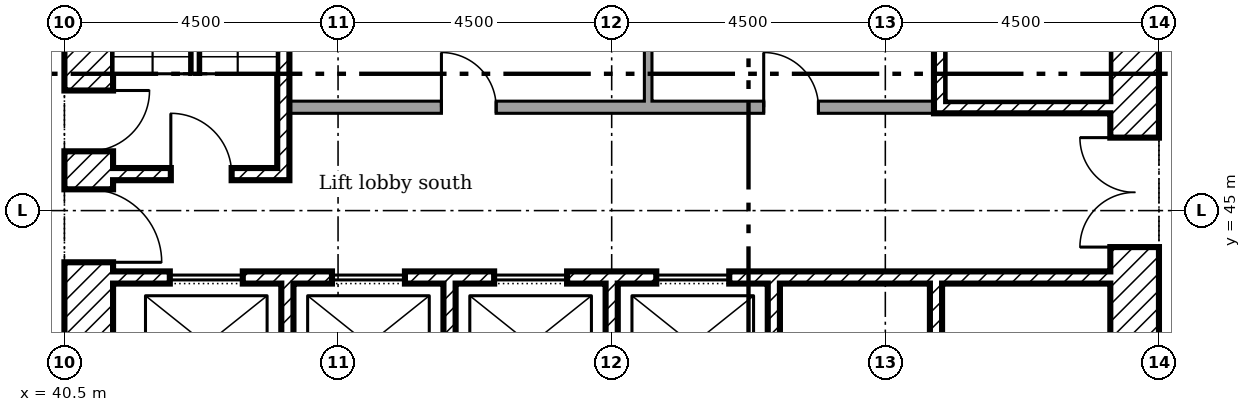
"""IFC4 building model, lengths in metres.
Left out: names, types, materials, properties, quantities, classifications, styles, units other than length and angle.
Written with IfcOpenShell. Run it as: python <this file> out.ifc"""

import sys

from ifc_helpers import new_model, si_unit, direction, frame, frame_2d, origin, place, context, subcontext, project, spatial, rectangle, extrude, element, fill, save


model = new_model("IFC4")
c1 = context("Model", 3, precision=1e-05, world=origin(), true_north=direction((0.0, 1.0)))
c2 = subcontext(c1, "Body", "Model", "MODEL_VIEW")
j1 = project(units=[si_unit("LENGTHUNIT", "METRE"), si_unit("PLANEANGLEUNIT", "RADIAN")], contexts=[c1])
p1 = place(None, origin())
s1 = spatial("IfcSite", under=j1, at=p1, CompositionType="ELEMENT")
p2 = place(p1, origin())
s2 = spatial("IfcBuilding", under=s1, at=p2, CompositionType="ELEMENT")
p3 = place(p2, frame((0.0, 0.0, 54.6)))
s3 = spatial("IfcBuildingStorey", under=s2, at=p3, CompositionType="ELEMENT", Elevation=54.6)
p4 = place(p3, frame((58.1, 40.5, 0.0), z_axis=(0.0, 0.0, 1.0), x_axis=(0.0, 1.0, 0.0)))
e1 = element("IfcWall", 1, at=p4, inside=s3, PredefinedType="SHEAR", context=c2, shape_type="SweptSolid", body=[
    extrude(rectangle(XDim=18.0, YDim=0.8, at=frame_2d((9.0, 0.0))), origin(), (0.0, 0.0, 1.0), 3.35),
])
p5 = place(p4, frame((13.15, 0.0, 0.0)))
e2 = element("IfcOpeningElement", 2, at=p5, cuts=e1, PredefinedType="OPENING", context=c2, shape_type="SweptSolid", body=[
    extrude(rectangle(XDim=1.2, YDim=2.1, at=frame_2d((0.6, 1.05))), frame((0.0, 0.41, 0.0), z_axis=(0.0, -1.0, 0.0), x_axis=(1.0, 0.0, 0.0)), (0.0, 0.0, 1.0), 0.82),
])
p6 = place(p4, frame((3.9, 0.0, 0.0)))
e3 = element("IfcOpeningElement", 3, at=p6, cuts=e1, PredefinedType="OPENING", context=c2, shape_type="SweptSolid", body=[
    extrude(rectangle(XDim=1.8, YDim=2.1, at=frame_2d((0.9, 1.05))), frame((0.0, 0.41, 0.0), z_axis=(0.0, -1.0, 0.0), x_axis=(1.0, 0.0, 0.0)), (0.0, 0.0, 1.0), 0.82),
])
p7 = place(p4, frame((11.525, 0.0, 0.0)))
e4 = element("IfcOpeningElement", 4, at=p7, cuts=e1, PredefinedType="OPENING", context=c2, shape_type="SweptSolid", body=[
    extrude(rectangle(XDim=1.0, YDim=2.1, at=frame_2d((0.5, 1.05))), frame((0.0, 0.41, 0.0), z_axis=(0.0, -1.0, 0.0), x_axis=(1.0, 0.0, 0.0)), (0.0, 0.0, 1.0), 0.82),
])
p8 = place(p3, frame((40.9, 40.5, 0.0), z_axis=(0.0, 0.0, 1.0), x_axis=(0.0, 1.0, 0.0)))
e5 = element("IfcWall", 5, at=p8, inside=s3, PredefinedType="SHEAR", context=c2, shape_type="SweptSolid", body=[
    extrude(rectangle(XDim=18.0, YDim=0.8, at=frame_2d((9.0, 0.0))), origin(), (0.0, 0.0, 1.0), 3.35),
])
p9 = place(p8, frame((3.65, 0.0, 0.0)))
e6 = element("IfcOpeningElement", 6, at=p9, cuts=e5, PredefinedType="OPENING", context=c2, shape_type="SweptSolid", body=[
    extrude(rectangle(XDim=1.2, YDim=2.1, at=frame_2d((0.6, 1.05))), frame((0.0, 0.41, 0.0), z_axis=(0.0, -1.0, 0.0), x_axis=(1.0, 0.0, 0.0)), (0.0, 0.0, 1.0), 0.82),
])
p10 = place(p8, frame((5.475, 0.0, 0.0)))
e7 = element("IfcOpeningElement", 7, at=p10, cuts=e5, PredefinedType="OPENING", context=c2, shape_type="SweptSolid", body=[
    extrude(rectangle(XDim=1.0, YDim=2.1, at=frame_2d((0.5, 1.05))), frame((0.0, 0.41, 0.0), z_axis=(0.0, -1.0, 0.0), x_axis=(1.0, 0.0, 0.0)), (0.0, 0.0, 1.0), 0.82),
])
p11 = place(p8, frame((12.3, 0.0, 0.0)))
e8 = element("IfcOpeningElement", 8, at=p11, cuts=e5, PredefinedType="OPENING", context=c2, shape_type="SweptSolid", body=[
    extrude(rectangle(XDim=1.0, YDim=2.1, at=frame_2d((0.5, 1.05))), frame((0.0, 0.41, 0.0), z_axis=(0.0, -1.0, 0.0), x_axis=(1.0, 0.0, 0.0)), (0.0, 0.0, 1.0), 0.82),
])
for number, where, z_axis, x_axis in (
    (9, (44.167, 41.3, 0.0), (0.0, 0.0, 1.0), (0.0, 1.0, 0.0)),
    (10, (46.833, 41.3, 0.0), (0.0, 0.0, 1.0), (0.0, 1.0, 0.0)),
    (11, (49.5, 41.3, 0.0), (0.0, 0.0, 1.0), (0.0, 1.0, 0.0)),
    (12, (52.167, 41.3, 0.0), (0.0, 0.0, 1.0), (0.0, 1.0, 0.0)),
    (13, (54.833, 41.3, 0.0), (0.0, 0.0, 1.0), (0.0, 1.0, 0.0)),
):
    element("IfcWall", number, at=place(p3, frame(where, z_axis=z_axis, x_axis=x_axis)), inside=s3, PredefinedType="SHEAR", context=c2, shape_type="SweptSolid", body=[
        extrude(rectangle(XDim=2.5, YDim=0.2, at=frame_2d((1.25, 0.0))), origin(), (0.0, 0.0, 1.0), 3.35),
    ])
p12 = place(p3, frame((41.3, 43.9, 0.0)))
e14 = element("IfcWall", 14, at=p12, inside=s3, PredefinedType="SHEAR", context=c2, shape_type="SweptSolid", body=[
    extrude(rectangle(XDim=16.4, YDim=0.2, at=frame_2d((8.2, 0.0))), origin(), (0.0, 0.0, 1.0), 3.35),
])
p13 = place(p12, frame((0.933, 0.0, 0.0)))
e15 = element("IfcOpeningElement", 15, at=p13, cuts=e14, PredefinedType="OPENING", context=c2, shape_type="SweptSolid", body=[
    extrude(rectangle(XDim=1.2, YDim=2.1, at=frame_2d((0.6, 1.05))), frame((0.0, 0.11, 0.0), z_axis=(0.0, -1.0, 0.0), x_axis=(1.0, 0.0, 0.0)), (0.0, 0.0, 1.0), 0.22),
])
p14 = place(p12, frame((3.6, 0.0, 0.0)))
e16 = element("IfcOpeningElement", 16, at=p14, cuts=e14, PredefinedType="OPENING", context=c2, shape_type="SweptSolid", body=[
    extrude(rectangle(XDim=1.2, YDim=2.1, at=frame_2d((0.6, 1.05))), frame((0.0, 0.11, 0.0), z_axis=(0.0, -1.0, 0.0), x_axis=(1.0, 0.0, 0.0)), (0.0, 0.0, 1.0), 0.22),
])
p15 = place(p12, frame((6.267, 0.0, 0.0)))
e17 = element("IfcOpeningElement", 17, at=p15, cuts=e14, PredefinedType="OPENING", context=c2, shape_type="SweptSolid", body=[
    extrude(rectangle(XDim=1.2, YDim=2.1, at=frame_2d((0.6, 1.05))), frame((0.0, 0.11, 0.0), z_axis=(0.0, -1.0, 0.0), x_axis=(1.0, 0.0, 0.0)), (0.0, 0.0, 1.0), 0.22),
])
p16 = place(p12, frame((8.933, 0.0, 0.0)))
e18 = element("IfcOpeningElement", 18, at=p16, cuts=e14, PredefinedType="OPENING", context=c2, shape_type="SweptSolid", body=[
    extrude(rectangle(XDim=1.2, YDim=2.1, at=frame_2d((0.6, 1.05))), frame((0.0, 0.11, 0.0), z_axis=(0.0, -1.0, 0.0), x_axis=(1.0, 0.0, 0.0)), (0.0, 0.0, 1.0), 0.22),
])
p17 = place(p3, frame((44.1, 45.5, 0.0), z_axis=(0.0, 0.0, 1.0), x_axis=(0.0, 1.0, 0.0)))
e19 = element("IfcWall", 19, at=p17, inside=s3, PredefinedType="SHEAR", context=c2, shape_type="SweptSolid", body=[
    extrude(rectangle(XDim=6.9, YDim=0.2, at=frame_2d((3.45, 0.0))), origin(), (0.0, 0.0, 1.0), 3.35),
])
p18 = place(p3, frame((41.3, 45.6, 0.0)))
e20 = element("IfcWall", 20, at=p18, inside=s3, PredefinedType="SHEAR", context=c2, shape_type="SweptSolid", body=[
    extrude(rectangle(XDim=2.7, YDim=0.2, at=frame_2d((1.35, 0.0))), origin(), (0.0, 0.0, 1.0), 3.35),
])
p19 = place(p18, frame((0.95, 0.0, 0.0)))
e21 = element("IfcOpeningElement", 21, at=p19, cuts=e20, PredefinedType="OPENING", context=c2, shape_type="SweptSolid", body=[
    extrude(rectangle(XDim=1.0, YDim=2.1, at=frame_2d((0.5, 1.05))), frame((0.0, 0.11, 0.0), z_axis=(0.0, -1.0, 0.0), x_axis=(1.0, 0.0, 0.0)), (0.0, 0.0, 1.0), 0.22),
])
p20 = place(p3, frame((54.8, 46.7, 0.0)))
e22 = element("IfcWall", 22, at=p20, inside=s3, PredefinedType="SHEAR", context=c2, shape_type="SweptSolid", body=[
    extrude(rectangle(XDim=2.9, YDim=0.2, at=frame_2d((1.45, 0.0))), origin(), (0.0, 0.0, 1.0), 3.35),
])
p21 = place(p3, frame((54.9, 46.8, 0.0), z_axis=(0.0, 0.0, 1.0), x_axis=(0.0, 1.0, 0.0)))
e23 = element("IfcWall", 23, at=p21, inside=s3, PredefinedType="SHEAR", context=c2, shape_type="SweptSolid", body=[
    extrude(rectangle(XDim=6.5, YDim=0.2, at=frame_2d((3.25, 0.0))), origin(), (0.0, 0.0, 1.0), 3.35),
])
p22 = place(p3, frame((44.2, 46.7, 0.0)))
e24 = element("IfcWall", 24, at=p22, inside=s3, PredefinedType="PARTITIONING", context=c2, shape_type="SweptSolid", body=[
    extrude(rectangle(XDim=10.6, YDim=0.2, at=frame_2d((5.3, 0.0))), origin(), (0.0, 0.0, 1.0), 3.35),
])
p23 = place(p22, frame((2.5, 0.0, 0.0)))
e25 = element("IfcOpeningElement", 25, at=p23, cuts=e24, PredefinedType="OPENING", context=c2, shape_type="SweptSolid", body=[
    extrude(rectangle(XDim=0.9, YDim=2.1, at=frame_2d((0.45, 1.05))), frame((0.0, 0.11, 0.0), z_axis=(0.0, -1.0, 0.0), x_axis=(1.0, 0.0, 0.0)), (0.0, 0.0, 1.0), 0.22),
])
p24 = place(p22, frame((7.8, 0.0, 0.0)))
e26 = element("IfcOpeningElement", 26, at=p24, cuts=e24, PredefinedType="OPENING", context=c2, shape_type="SweptSolid", body=[
    extrude(rectangle(XDim=0.9, YDim=2.1, at=frame_2d((0.45, 1.05))), frame((0.0, 0.11, 0.0), z_axis=(0.0, -1.0, 0.0), x_axis=(1.0, 0.0, 0.0)), (0.0, 0.0, 1.0), 0.22),
])
p25 = place(p3, frame((50.1, 46.8, 0.0), z_axis=(0.0, 0.0, 1.0), x_axis=(0.0, 1.0, 0.0)))
e27 = element("IfcWall", 27, at=p25, inside=s3, PredefinedType="PARTITIONING", context=c2, shape_type="SweptSolid", body=[
    extrude(rectangle(XDim=1.962, YDim=0.125, at=frame_2d((0.981, 0.0))), origin(), (0.0, 0.0, 1.0), 3.35),
])
p26 = place(p6, origin())
e28 = element("IfcDoor", 28, at=p26, inside=s3, OperationType="DOUBLE_DOOR_SINGLE_SWING", PredefinedType="DOOR", context=c2, shape_type="SweptSolid", body=[
    extrude(rectangle(XDim=1.8, YDim=2.1, at=frame_2d((0.9, 1.05))), frame((0.0, 0.025, 0.0), z_axis=(0.0, -1.0, 0.0), x_axis=(1.0, 0.0, 0.0)), (0.0, 0.0, 1.0), 0.05),
])
fill(e3, e28)
p27 = place(p9, frame((1.2, 0.0, 0.0), x_axis=(-1.0, 0.0, 0.0)))
e29 = element("IfcDoor", 29, at=p27, inside=s3, OperationType="SINGLE_SWING_LEFT", PredefinedType="DOOR", context=c2, shape_type="SweptSolid", body=[
    extrude(rectangle(XDim=1.2, YDim=2.1, at=frame_2d((0.6, 1.05))), frame((0.0, 0.025, 0.0), z_axis=(0.0, -1.0, 0.0), x_axis=(1.0, 0.0, 0.0)), (0.0, 0.0, 1.0), 0.05),
])
fill(e6, e29)
p28 = place(p19, origin())
e30 = element("IfcDoor", 30, at=p28, inside=s3, OperationType="SINGLE_SWING_RIGHT", PredefinedType="DOOR", context=c2, shape_type="SweptSolid", body=[
    extrude(rectangle(XDim=1.0, YDim=2.1, at=frame_2d((0.5, 1.05))), frame((0.0, 0.025, 0.0), z_axis=(0.0, -1.0, 0.0), x_axis=(1.0, 0.0, 0.0)), (0.0, 0.0, 1.0), 0.05),
])
fill(e21, e30)
p29 = place(p10, frame((1.0, 0.0, 0.0), x_axis=(-1.0, 0.0, 0.0)))
e31 = element("IfcDoor", 31, at=p29, inside=s3, OperationType="SINGLE_SWING_RIGHT", PredefinedType="DOOR", context=c2, shape_type="SweptSolid", body=[
    extrude(rectangle(XDim=1.0, YDim=2.1, at=frame_2d((0.5, 1.05))), frame((0.0, 0.025, 0.0), z_axis=(0.0, -1.0, 0.0), x_axis=(1.0, 0.0, 0.0)), (0.0, 0.0, 1.0), 0.05),
])
fill(e7, e31)
p30 = place(p23, origin())
e32 = element("IfcDoor", 32, at=p30, inside=s3, OperationType="SINGLE_SWING_RIGHT", PredefinedType="DOOR", context=c2, shape_type="SweptSolid", body=[
    extrude(rectangle(XDim=0.9, YDim=2.1, at=frame_2d((0.45, 1.05))), frame((0.0, 0.025, 0.0), z_axis=(0.0, -1.0, 0.0), x_axis=(1.0, 0.0, 0.0)), (0.0, 0.0, 1.0), 0.05),
])
fill(e25, e32)
p31 = place(p24, origin())
e33 = element("IfcDoor", 33, at=p31, inside=s3, OperationType="SINGLE_SWING_RIGHT", PredefinedType="DOOR", context=c2, shape_type="SweptSolid", body=[
    extrude(rectangle(XDim=0.9, YDim=2.1, at=frame_2d((0.45, 1.05))), frame((0.0, 0.025, 0.0), z_axis=(0.0, -1.0, 0.0), x_axis=(1.0, 0.0, 0.0)), (0.0, 0.0, 1.0), 0.05),
])
fill(e26, e33)
p32 = place(p13, origin())
e34 = element("IfcDoor", 34, at=p32, inside=s3, OperationType="SLIDING_TO_LEFT", PredefinedType="DOOR", context=c2, shape_type="SweptSolid", body=[
    extrude(rectangle(XDim=1.2, YDim=2.1, at=frame_2d((0.6, 1.05))), frame((0.0, 0.025, 0.0), z_axis=(0.0, -1.0, 0.0), x_axis=(1.0, 0.0, 0.0)), (0.0, 0.0, 1.0), 0.05),
])
fill(e15, e34)
p33 = place(p14, origin())
e35 = element("IfcDoor", 35, at=p33, inside=s3, OperationType="SLIDING_TO_LEFT", PredefinedType="DOOR", context=c2, shape_type="SweptSolid", body=[
    extrude(rectangle(XDim=1.2, YDim=2.1, at=frame_2d((0.6, 1.05))), frame((0.0, 0.025, 0.0), z_axis=(0.0, -1.0, 0.0), x_axis=(1.0, 0.0, 0.0)), (0.0, 0.0, 1.0), 0.05),
])
fill(e16, e35)
p34 = place(p15, origin())
e36 = element("IfcDoor", 36, at=p34, inside=s3, OperationType="SLIDING_TO_LEFT", PredefinedType="DOOR", context=c2, shape_type="SweptSolid", body=[
    extrude(rectangle(XDim=1.2, YDim=2.1, at=frame_2d((0.6, 1.05))), frame((0.0, 0.025, 0.0), z_axis=(0.0, -1.0, 0.0), x_axis=(1.0, 0.0, 0.0)), (0.0, 0.0, 1.0), 0.05),
])
fill(e17, e36)
p35 = place(p16, origin())
e37 = element("IfcDoor", 37, at=p35, inside=s3, OperationType="SLIDING_TO_LEFT", PredefinedType="DOOR", context=c2, shape_type="SweptSolid", body=[
    extrude(rectangle(XDim=1.2, YDim=2.1, at=frame_2d((0.6, 1.05))), frame((0.0, 0.025, 0.0), z_axis=(0.0, -1.0, 0.0), x_axis=(1.0, 0.0, 0.0)), (0.0, 0.0, 1.0), 0.05),
])
fill(e18, e37)
save(model, sys.argv[1])
